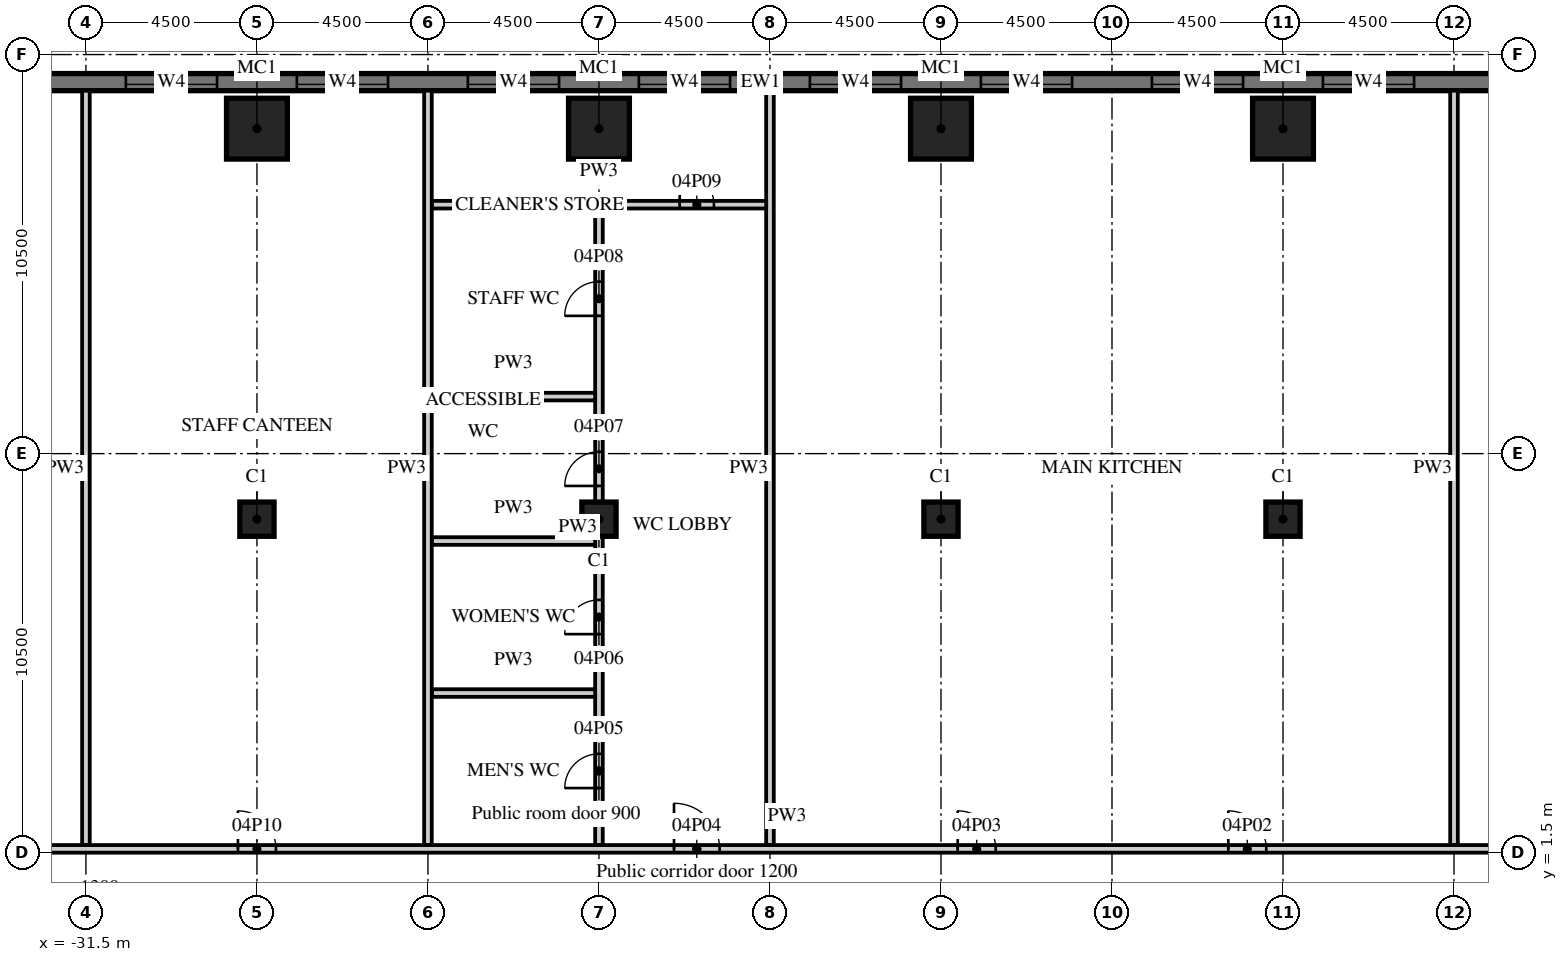
"""IFC4 building model, lengths in metres.
Left out: names, types, materials, properties, quantities, classifications, styles, units other than length and angle.
Written with IfcOpenShell. Run it as: python <this file> out.ifc"""

import sys

from ifc_helpers import new_model, si_unit, direction, frame, frame_2d, origin, origin_2d, place, context, subcontext, project, spatial, rectangle, extrude, element, fill, save


model = new_model("IFC4")
c1 = context("Model", 3, precision=1e-05, world=origin(), true_north=direction((0.0, 1.0)))
c2 = subcontext(c1, "Body", "Model", "MODEL_VIEW")
j1 = project(units=[si_unit("LENGTHUNIT", "METRE"), si_unit("PLANEANGLEUNIT", "RADIAN")], contexts=[c1])
p1 = place(None, origin())
s1 = spatial("IfcSite", under=j1, at=p1, CompositionType="ELEMENT")
p2 = place(p1, origin())
s2 = spatial("IfcBuilding", under=s1, at=p2, CompositionType="ELEMENT")
p3 = place(p2, frame((0.0, 0.0, 29.0)))
s3 = spatial("IfcBuildingStorey", under=s2, at=p3, CompositionType="ELEMENT", Elevation=29.0)
for number, where, z_axis, x_axis in (
    (1, (-27.0, 20.55, 0.0), (0.0, 0.0, 1.0), (1.0, 0.0, 0.0)),
    (2, (-18.0, 20.55, 0.0), (0.0, 0.0, 1.0), (1.0, 0.0, 0.0)),
    (3, (-9.0, 20.55, 0.0), (0.0, 0.0, 1.0), (1.0, 0.0, 0.0)),
    (4, (0.0, 20.55, 0.0), (0.0, 0.0, 1.0), (1.0, 0.0, 0.0)),
):
    element("IfcColumn", number, at=place(p3, frame(where, z_axis=z_axis, x_axis=x_axis)), inside=s3, PredefinedType="COLUMN", context=c2, shape_type="SweptSolid", body=[
        extrude(rectangle(XDim=1.6, YDim=1.6, at=origin_2d()), origin(), (0.0, 0.0, 1.0), 4.5),
    ])
for number, where, z_axis, x_axis in (
    (5, (-27.0, 10.275, 0.0), (0.0, 0.0, 1.0), (1.0, 0.0, 0.0)),
    (6, (-18.0, 10.275, 0.0), (0.0, 0.0, 1.0), (1.0, 0.0, 0.0)),
    (7, (-9.0, 10.275, 0.0), (0.0, 0.0, 1.0), (1.0, 0.0, 0.0)),
    (8, (0.0, 10.275, 0.0), (0.0, 0.0, 1.0), (1.0, 0.0, 0.0)),
):
    element("IfcColumn", number, at=place(p3, frame(where, z_axis=z_axis, x_axis=x_axis)), inside=s3, PredefinedType="COLUMN", context=c2, shape_type="SweptSolid", body=[
        extrude(rectangle(XDim=0.9, YDim=0.9, at=origin_2d()), origin(), (0.0, 0.0, 1.0), 4.5),
    ])
p4 = place(p3, frame((13.5, 21.775, 0.0), z_axis=(0.0, 0.0, 1.0), x_axis=(-1.0, 0.0, 0.0)))
e9 = element("IfcWall", 9, at=p4, inside=s3, PredefinedType="SOLIDWALL", context=c2, shape_type="SweptSolid", body=[
    extrude(rectangle(XDim=54.5, YDim=0.45, at=frame_2d((27.25, 0.0))), origin(), (0.0, 0.0, 1.0), 4.05),
])
p5 = place(p4, frame((1.05, 0.0, 0.9)))
e10 = element("IfcOpeningElement", 10, at=p5, cuts=e9, PredefinedType="OPENING", context=c2, shape_type="SweptSolid", body=[
    extrude(rectangle(XDim=2.4, YDim=1.8, at=frame_2d((1.2, 0.9))), frame((0.0, 0.235, 0.0), z_axis=(0.0, -1.0, 0.0), x_axis=(1.0, 0.0, 0.0)), (0.0, 0.0, 1.0), 0.47),
])
p6 = place(p4, frame((5.55, 0.0, 0.9)))
e11 = element("IfcOpeningElement", 11, at=p6, cuts=e9, PredefinedType="OPENING", context=c2, shape_type="SweptSolid", body=[
    extrude(rectangle(XDim=2.4, YDim=1.8, at=frame_2d((1.2, 0.9))), frame((0.0, 0.235, 0.0), z_axis=(0.0, -1.0, 0.0), x_axis=(1.0, 0.0, 0.0)), (0.0, 0.0, 1.0), 0.47),
])
p7 = place(p4, frame((10.05, 0.0, 0.9)))
e12 = element("IfcOpeningElement", 12, at=p7, cuts=e9, PredefinedType="OPENING", context=c2, shape_type="SweptSolid", body=[
    extrude(rectangle(XDim=2.4, YDim=1.8, at=frame_2d((1.2, 0.9))), frame((0.0, 0.235, 0.0), z_axis=(0.0, -1.0, 0.0), x_axis=(1.0, 0.0, 0.0)), (0.0, 0.0, 1.0), 0.47),
])
p8 = place(p4, frame((14.55, 0.0, 0.9)))
e13 = element("IfcOpeningElement", 13, at=p8, cuts=e9, PredefinedType="OPENING", context=c2, shape_type="SweptSolid", body=[
    extrude(rectangle(XDim=2.4, YDim=1.8, at=frame_2d((1.2, 0.9))), frame((0.0, 0.235, 0.0), z_axis=(0.0, -1.0, 0.0), x_axis=(1.0, 0.0, 0.0)), (0.0, 0.0, 1.0), 0.47),
])
p9 = place(p4, frame((19.05, 0.0, 0.9)))
e14 = element("IfcOpeningElement", 14, at=p9, cuts=e9, PredefinedType="OPENING", context=c2, shape_type="SweptSolid", body=[
    extrude(rectangle(XDim=2.4, YDim=1.8, at=frame_2d((1.2, 0.9))), frame((0.0, 0.235, 0.0), z_axis=(0.0, -1.0, 0.0), x_axis=(1.0, 0.0, 0.0)), (0.0, 0.0, 1.0), 0.47),
])
p10 = place(p4, frame((23.55, 0.0, 0.9)))
e15 = element("IfcOpeningElement", 15, at=p10, cuts=e9, PredefinedType="OPENING", context=c2, shape_type="SweptSolid", body=[
    extrude(rectangle(XDim=2.4, YDim=1.8, at=frame_2d((1.2, 0.9))), frame((0.0, 0.235, 0.0), z_axis=(0.0, -1.0, 0.0), x_axis=(1.0, 0.0, 0.0)), (0.0, 0.0, 1.0), 0.47),
])
p11 = place(p4, frame((28.05, 0.0, 0.9)))
e16 = element("IfcOpeningElement", 16, at=p11, cuts=e9, PredefinedType="OPENING", context=c2, shape_type="SweptSolid", body=[
    extrude(rectangle(XDim=2.4, YDim=1.8, at=frame_2d((1.2, 0.9))), frame((0.0, 0.235, 0.0), z_axis=(0.0, -1.0, 0.0), x_axis=(1.0, 0.0, 0.0)), (0.0, 0.0, 1.0), 0.47),
])
p12 = place(p4, frame((32.55, 0.0, 0.9)))
e17 = element("IfcOpeningElement", 17, at=p12, cuts=e9, PredefinedType="OPENING", context=c2, shape_type="SweptSolid", body=[
    extrude(rectangle(XDim=2.4, YDim=1.8, at=frame_2d((1.2, 0.9))), frame((0.0, 0.235, 0.0), z_axis=(0.0, -1.0, 0.0), x_axis=(1.0, 0.0, 0.0)), (0.0, 0.0, 1.0), 0.47),
])
p13 = place(p4, frame((37.05, 0.0, 0.9)))
e18 = element("IfcOpeningElement", 18, at=p13, cuts=e9, PredefinedType="OPENING", context=c2, shape_type="SweptSolid", body=[
    extrude(rectangle(XDim=2.4, YDim=1.8, at=frame_2d((1.2, 0.9))), frame((0.0, 0.235, 0.0), z_axis=(0.0, -1.0, 0.0), x_axis=(1.0, 0.0, 0.0)), (0.0, 0.0, 1.0), 0.47),
])
p14 = place(p4, frame((41.55, 0.0, 0.9)))
e19 = element("IfcOpeningElement", 19, at=p14, cuts=e9, PredefinedType="OPENING", context=c2, shape_type="SweptSolid", body=[
    extrude(rectangle(XDim=2.4, YDim=1.8, at=frame_2d((1.2, 0.9))), frame((0.0, 0.235, 0.0), z_axis=(0.0, -1.0, 0.0), x_axis=(1.0, 0.0, 0.0)), (0.0, 0.0, 1.0), 0.47),
])
p15 = place(p4, frame((46.05, 0.0, 0.9)))
e20 = element("IfcOpeningElement", 20, at=p15, cuts=e9, PredefinedType="OPENING", context=c2, shape_type="SweptSolid", body=[
    extrude(rectangle(XDim=2.4, YDim=1.8, at=frame_2d((1.2, 0.9))), frame((0.0, 0.235, 0.0), z_axis=(0.0, -1.0, 0.0), x_axis=(1.0, 0.0, 0.0)), (0.0, 0.0, 1.0), 0.47),
])
for number, where, z_axis, x_axis in (
    (21, (4.5, 1.7, 0.0), (0.0, 0.0, 1.0), (0.0, 1.0, 0.0)),
    (22, (-13.5, 1.7, 0.0), (0.0, 0.0, 1.0), (0.0, 1.0, 0.0)),
):
    element("IfcWall", number, at=place(p3, frame(where, z_axis=z_axis, x_axis=x_axis)), inside=s3, PredefinedType="PARTITIONING", context=c2, shape_type="SweptSolid", body=[
        extrude(rectangle(XDim=19.85, YDim=0.2, at=frame_2d((9.925, 0.0))), origin(), (0.0, 0.0, 1.0), 4.05),
    ])
p16 = place(p3, frame((-18.0, 1.7, 0.0), z_axis=(0.0, 0.0, 1.0), x_axis=(0.0, 1.0, 0.0)))
e23 = element("IfcWall", 23, at=p16, inside=s3, PredefinedType="PARTITIONING", context=c2, shape_type="SweptSolid", body=[
    extrude(rectangle(XDim=16.75, YDim=0.2, at=frame_2d((8.375, 0.0))), origin(), (0.0, 0.0, 1.0), 4.05),
])
p17 = place(p16, frame((1.5, 0.0, 0.0)))
e24 = element("IfcOpeningElement", 24, at=p17, cuts=e23, PredefinedType="OPENING", context=c2, shape_type="SweptSolid", body=[
    extrude(rectangle(XDim=0.9, YDim=2.1, at=frame_2d((0.45, 1.05))), frame((0.0, 0.11, 0.0), z_axis=(0.0, -1.0, 0.0), x_axis=(1.0, 0.0, 0.0)), (0.0, 0.0, 1.0), 0.22),
])
p18 = place(p16, frame((5.55, 0.0, 0.0)))
e25 = element("IfcOpeningElement", 25, at=p18, cuts=e23, PredefinedType="OPENING", context=c2, shape_type="SweptSolid", body=[
    extrude(rectangle(XDim=0.9, YDim=2.1, at=frame_2d((0.45, 1.05))), frame((0.0, 0.11, 0.0), z_axis=(0.0, -1.0, 0.0), x_axis=(1.0, 0.0, 0.0)), (0.0, 0.0, 1.0), 0.22),
])
p19 = place(p16, frame((9.45, 0.0, 0.0)))
e26 = element("IfcOpeningElement", 26, at=p19, cuts=e23, PredefinedType="OPENING", context=c2, shape_type="SweptSolid", body=[
    extrude(rectangle(XDim=0.9, YDim=2.1, at=frame_2d((0.45, 1.05))), frame((0.0, 0.11, 0.0), z_axis=(0.0, -1.0, 0.0), x_axis=(1.0, 0.0, 0.0)), (0.0, 0.0, 1.0), 0.22),
])
p20 = place(p16, frame((13.925, 0.0, 0.0)))
e27 = element("IfcOpeningElement", 27, at=p20, cuts=e23, PredefinedType="OPENING", context=c2, shape_type="SweptSolid", body=[
    extrude(rectangle(XDim=0.9, YDim=2.1, at=frame_2d((0.45, 1.05))), frame((0.0, 0.11, 0.0), z_axis=(0.0, -1.0, 0.0), x_axis=(1.0, 0.0, 0.0)), (0.0, 0.0, 1.0), 0.22),
])
for number, where, z_axis, x_axis in (
    (28, (-22.4, 5.7, 0.0), (0.0, 0.0, 1.0), (1.0, 0.0, 0.0)),
    (29, (-22.4, 9.7, 0.0), (0.0, 0.0, 1.0), (1.0, 0.0, 0.0)),
    (30, (-22.4, 13.5, 0.0), (0.0, 0.0, 1.0), (1.0, 0.0, 0.0)),
):
    element("IfcWall", number, at=place(p3, frame(where, z_axis=z_axis, x_axis=x_axis)), inside=s3, PredefinedType="PARTITIONING", context=c2, shape_type="SweptSolid", body=[
        extrude(rectangle(XDim=4.3, YDim=0.2, at=frame_2d((2.15, 0.0))), origin(), (0.0, 0.0, 1.0), 4.05),
    ])
p21 = place(p3, frame((-22.4, 18.55, 0.0), z_axis=(0.0, 0.0, 1.0), x_axis=(1.0, 0.0, 0.0)))
e31 = element("IfcWall", 31, at=p21, inside=s3, PredefinedType="PARTITIONING", context=c2, shape_type="SweptSolid", body=[
    extrude(rectangle(XDim=8.8, YDim=0.2, at=frame_2d((4.4, 0.0))), origin(), (0.0, 0.0, 1.0), 4.05),
])
p22 = place(p21, frame((6.525, 0.0, 0.0)))
e32 = element("IfcOpeningElement", 32, at=p22, cuts=e31, PredefinedType="OPENING", context=c2, shape_type="SweptSolid", body=[
    extrude(rectangle(XDim=0.9, YDim=2.1, at=frame_2d((0.45, 1.05))), frame((0.0, 0.11, 0.0), z_axis=(0.0, -1.0, 0.0), x_axis=(1.0, 0.0, 0.0)), (0.0, 0.0, 1.0), 0.22),
])
for number, where, z_axis, x_axis in (
    (33, (-22.5, 1.7, 0.0), (0.0, 0.0, 1.0), (0.0, 1.0, 0.0)),
    (34, (-31.5, 1.7, 0.0), (0.0, 0.0, 1.0), (0.0, 1.0, 0.0)),
):
    element("IfcWall", number, at=place(p3, frame(where, z_axis=z_axis, x_axis=x_axis)), inside=s3, PredefinedType="PARTITIONING", context=c2, shape_type="SweptSolid", body=[
        extrude(rectangle(XDim=19.85, YDim=0.2, at=frame_2d((9.925, 0.0))), origin(), (0.0, 0.0, 1.0), 4.05),
    ])
p23 = place(p3, frame((-39.4, 1.6, 0.0), z_axis=(0.0, 0.0, 1.0), x_axis=(1.0, 0.0, 0.0)))
e35 = element("IfcWall", 35, at=p23, inside=s3, PredefinedType="PARTITIONING", context=c2, shape_type="SweptSolid", body=[
    extrude(rectangle(XDim=52.7, YDim=0.2, at=frame_2d((26.35, 0.0))), origin(), (0.0, 0.0, 1.0), 4.05),
])
p24 = place(p23, frame((47.85, 0.0, 0.0)))
e36 = element("IfcOpeningElement", 36, at=p24, cuts=e35, PredefinedType="OPENING", context=c2, shape_type="SweptSolid", body=[
    extrude(rectangle(XDim=1.0, YDim=2.1, at=frame_2d((0.5, 1.05))), frame((0.0, 0.11, 0.0), z_axis=(0.0, -1.0, 0.0), x_axis=(1.0, 0.0, 0.0)), (0.0, 0.0, 1.0), 0.22),
])
p25 = place(p23, frame((37.96, 0.0, 0.0)))
e37 = element("IfcOpeningElement", 37, at=p25, cuts=e35, PredefinedType="OPENING", context=c2, shape_type="SweptSolid", body=[
    extrude(rectangle(XDim=1.0, YDim=2.1, at=frame_2d((0.5, 1.05))), frame((0.0, 0.11, 0.0), z_axis=(0.0, -1.0, 0.0), x_axis=(1.0, 0.0, 0.0)), (0.0, 0.0, 1.0), 0.22),
])
p26 = place(p23, frame((30.84, 0.0, 0.0)))
e38 = element("IfcOpeningElement", 38, at=p26, cuts=e35, PredefinedType="OPENING", context=c2, shape_type="SweptSolid", body=[
    extrude(rectangle(XDim=1.0, YDim=2.1, at=frame_2d((0.5, 1.05))), frame((0.0, 0.11, 0.0), z_axis=(0.0, -1.0, 0.0), x_axis=(1.0, 0.0, 0.0)), (0.0, 0.0, 1.0), 0.22),
])
p27 = place(p23, frame((23.375, 0.0, 0.0)))
e39 = element("IfcOpeningElement", 39, at=p27, cuts=e35, PredefinedType="OPENING", context=c2, shape_type="SweptSolid", body=[
    extrude(rectangle(XDim=1.2, YDim=2.1, at=frame_2d((0.6, 1.05))), frame((0.0, 0.11, 0.0), z_axis=(0.0, -1.0, 0.0), x_axis=(1.0, 0.0, 0.0)), (0.0, 0.0, 1.0), 0.22),
])
p28 = place(p23, frame((11.9, 0.0, 0.0)))
e40 = element("IfcOpeningElement", 40, at=p28, cuts=e35, PredefinedType="OPENING", context=c2, shape_type="SweptSolid", body=[
    extrude(rectangle(XDim=1.0, YDim=2.1, at=frame_2d((0.5, 1.05))), frame((0.0, 0.11, 0.0), z_axis=(0.0, -1.0, 0.0), x_axis=(1.0, 0.0, 0.0)), (0.0, 0.0, 1.0), 0.22),
])
p29 = place(p23, frame((3.5, 0.0, 0.0)))
e41 = element("IfcOpeningElement", 41, at=p29, cuts=e35, PredefinedType="OPENING", context=c2, shape_type="SweptSolid", body=[
    extrude(rectangle(XDim=1.0, YDim=2.1, at=frame_2d((0.5, 1.05))), frame((0.0, 0.11, 0.0), z_axis=(0.0, -1.0, 0.0), x_axis=(1.0, 0.0, 0.0)), (0.0, 0.0, 1.0), 0.22),
])
p30 = place(p7, origin())
e42 = element("IfcWindow", 42, at=p30, inside=s3, PartitioningType="SINGLE_PANEL", PredefinedType="WINDOW", context=c2, shape_type="SweptSolid", body=[
    extrude(rectangle(XDim=2.4, YDim=1.8, at=frame_2d((1.2, 0.9))), frame((0.0, 0.09, 0.0), z_axis=(0.0, -1.0, 0.0), x_axis=(1.0, 0.0, 0.0)), (0.0, 0.0, 1.0), 0.06),
])
fill(e12, e42)
p31 = place(p8, origin())
e43 = element("IfcWindow", 43, at=p31, inside=s3, PartitioningType="SINGLE_PANEL", PredefinedType="WINDOW", context=c2, shape_type="SweptSolid", body=[
    extrude(rectangle(XDim=2.4, YDim=1.8, at=frame_2d((1.2, 0.9))), frame((0.0, 0.09, 0.0), z_axis=(0.0, -1.0, 0.0), x_axis=(1.0, 0.0, 0.0)), (0.0, 0.0, 1.0), 0.06),
])
fill(e13, e43)
p32 = place(p9, origin())
e44 = element("IfcWindow", 44, at=p32, inside=s3, PartitioningType="SINGLE_PANEL", PredefinedType="WINDOW", context=c2, shape_type="SweptSolid", body=[
    extrude(rectangle(XDim=2.4, YDim=1.8, at=frame_2d((1.2, 0.9))), frame((0.0, 0.09, 0.0), z_axis=(0.0, -1.0, 0.0), x_axis=(1.0, 0.0, 0.0)), (0.0, 0.0, 1.0), 0.06),
])
fill(e14, e44)
p33 = place(p10, origin())
e45 = element("IfcWindow", 45, at=p33, inside=s3, PartitioningType="SINGLE_PANEL", PredefinedType="WINDOW", context=c2, shape_type="SweptSolid", body=[
    extrude(rectangle(XDim=2.4, YDim=1.8, at=frame_2d((1.2, 0.9))), frame((0.0, 0.09, 0.0), z_axis=(0.0, -1.0, 0.0), x_axis=(1.0, 0.0, 0.0)), (0.0, 0.0, 1.0), 0.06),
])
fill(e15, e45)
p34 = place(p11, origin())
e46 = element("IfcWindow", 46, at=p34, inside=s3, PartitioningType="SINGLE_PANEL", PredefinedType="WINDOW", context=c2, shape_type="SweptSolid", body=[
    extrude(rectangle(XDim=2.4, YDim=1.8, at=frame_2d((1.2, 0.9))), frame((0.0, 0.09, 0.0), z_axis=(0.0, -1.0, 0.0), x_axis=(1.0, 0.0, 0.0)), (0.0, 0.0, 1.0), 0.06),
])
fill(e16, e46)
p35 = place(p12, origin())
e47 = element("IfcWindow", 47, at=p35, inside=s3, PartitioningType="SINGLE_PANEL", PredefinedType="WINDOW", context=c2, shape_type="SweptSolid", body=[
    extrude(rectangle(XDim=2.4, YDim=1.8, at=frame_2d((1.2, 0.9))), frame((0.0, 0.09, 0.0), z_axis=(0.0, -1.0, 0.0), x_axis=(1.0, 0.0, 0.0)), (0.0, 0.0, 1.0), 0.06),
])
fill(e17, e47)
p36 = place(p13, origin())
e48 = element("IfcWindow", 48, at=p36, inside=s3, PartitioningType="SINGLE_PANEL", PredefinedType="WINDOW", context=c2, shape_type="SweptSolid", body=[
    extrude(rectangle(XDim=2.4, YDim=1.8, at=frame_2d((1.2, 0.9))), frame((0.0, 0.09, 0.0), z_axis=(0.0, -1.0, 0.0), x_axis=(1.0, 0.0, 0.0)), (0.0, 0.0, 1.0), 0.06),
])
fill(e18, e48)
p37 = place(p14, origin())
e49 = element("IfcWindow", 49, at=p37, inside=s3, PartitioningType="SINGLE_PANEL", PredefinedType="WINDOW", context=c2, shape_type="SweptSolid", body=[
    extrude(rectangle(XDim=2.4, YDim=1.8, at=frame_2d((1.2, 0.9))), frame((0.0, 0.09, 0.0), z_axis=(0.0, -1.0, 0.0), x_axis=(1.0, 0.0, 0.0)), (0.0, 0.0, 1.0), 0.06),
])
fill(e19, e49)
p38 = place(p25, origin())
e50 = element("IfcDoor", 50, at=p38, inside=s3, OperationType="SINGLE_SWING_LEFT", PredefinedType="DOOR", context=c2, shape_type="SweptSolid", body=[
    extrude(rectangle(XDim=1.0, YDim=2.1, at=frame_2d((0.5, 1.05))), frame((0.0, 0.025, 0.0), z_axis=(0.0, -1.0, 0.0), x_axis=(1.0, 0.0, 0.0)), (0.0, 0.0, 1.0), 0.05),
])
fill(e37, e50)
p39 = place(p26, origin())
e51 = element("IfcDoor", 51, at=p39, inside=s3, OperationType="SINGLE_SWING_LEFT", PredefinedType="DOOR", context=c2, shape_type="SweptSolid", body=[
    extrude(rectangle(XDim=1.0, YDim=2.1, at=frame_2d((0.5, 1.05))), frame((0.0, 0.025, 0.0), z_axis=(0.0, -1.0, 0.0), x_axis=(1.0, 0.0, 0.0)), (0.0, 0.0, 1.0), 0.05),
])
fill(e38, e51)
p40 = place(p27, origin())
e52 = element("IfcDoor", 52, at=p40, inside=s3, OperationType="SINGLE_SWING_LEFT", PredefinedType="DOOR", context=c2, shape_type="SweptSolid", body=[
    extrude(rectangle(XDim=1.2, YDim=2.1, at=frame_2d((0.6, 1.05))), frame((0.0, 0.025, 0.0), z_axis=(0.0, -1.0, 0.0), x_axis=(1.0, 0.0, 0.0)), (0.0, 0.0, 1.0), 0.05),
])
fill(e39, e52)
p41 = place(p17, origin())
e53 = element("IfcDoor", 53, at=p41, inside=s3, OperationType="SINGLE_SWING_LEFT", PredefinedType="DOOR", context=c2, shape_type="SweptSolid", body=[
    extrude(rectangle(XDim=0.9, YDim=2.1, at=frame_2d((0.45, 1.05))), frame((0.0, 0.025, 0.0), z_axis=(0.0, -1.0, 0.0), x_axis=(1.0, 0.0, 0.0)), (0.0, 0.0, 1.0), 0.05),
])
fill(e24, e53)
p42 = place(p18, origin())
e54 = element("IfcDoor", 54, at=p42, inside=s3, OperationType="SINGLE_SWING_LEFT", PredefinedType="DOOR", context=c2, shape_type="SweptSolid", body=[
    extrude(rectangle(XDim=0.9, YDim=2.1, at=frame_2d((0.45, 1.05))), frame((0.0, 0.025, 0.0), z_axis=(0.0, -1.0, 0.0), x_axis=(1.0, 0.0, 0.0)), (0.0, 0.0, 1.0), 0.05),
])
fill(e25, e54)
p43 = place(p19, origin())
e55 = element("IfcDoor", 55, at=p43, inside=s3, OperationType="SINGLE_SWING_LEFT", PredefinedType="DOOR", context=c2, shape_type="SweptSolid", body=[
    extrude(rectangle(XDim=0.9, YDim=2.1, at=frame_2d((0.45, 1.05))), frame((0.0, 0.025, 0.0), z_axis=(0.0, -1.0, 0.0), x_axis=(1.0, 0.0, 0.0)), (0.0, 0.0, 1.0), 0.05),
])
fill(e26, e55)
p44 = place(p20, origin())
e56 = element("IfcDoor", 56, at=p44, inside=s3, OperationType="SINGLE_SWING_LEFT", PredefinedType="DOOR", context=c2, shape_type="SweptSolid", body=[
    extrude(rectangle(XDim=0.9, YDim=2.1, at=frame_2d((0.45, 1.05))), frame((0.0, 0.025, 0.0), z_axis=(0.0, -1.0, 0.0), x_axis=(1.0, 0.0, 0.0)), (0.0, 0.0, 1.0), 0.05),
])
fill(e27, e56)
p45 = place(p22, origin())
e57 = element("IfcDoor", 57, at=p45, inside=s3, OperationType="SINGLE_SWING_LEFT", PredefinedType="DOOR", context=c2, shape_type="SweptSolid", body=[
    extrude(rectangle(XDim=0.9, YDim=2.1, at=frame_2d((0.45, 1.05))), frame((0.0, 0.025, 0.0), z_axis=(0.0, -1.0, 0.0), x_axis=(1.0, 0.0, 0.0)), (0.0, 0.0, 1.0), 0.05),
])
fill(e32, e57)
p46 = place(p28, origin())
e58 = element("IfcDoor", 58, at=p46, inside=s3, OperationType="SINGLE_SWING_LEFT", PredefinedType="DOOR", context=c2, shape_type="SweptSolid", body=[
    extrude(rectangle(XDim=1.0, YDim=2.1, at=frame_2d((0.5, 1.05))), frame((0.0, 0.025, 0.0), z_axis=(0.0, -1.0, 0.0), x_axis=(1.0, 0.0, 0.0)), (0.0, 0.0, 1.0), 0.05),
])
fill(e40, e58)
save(model, sys.argv[1])
